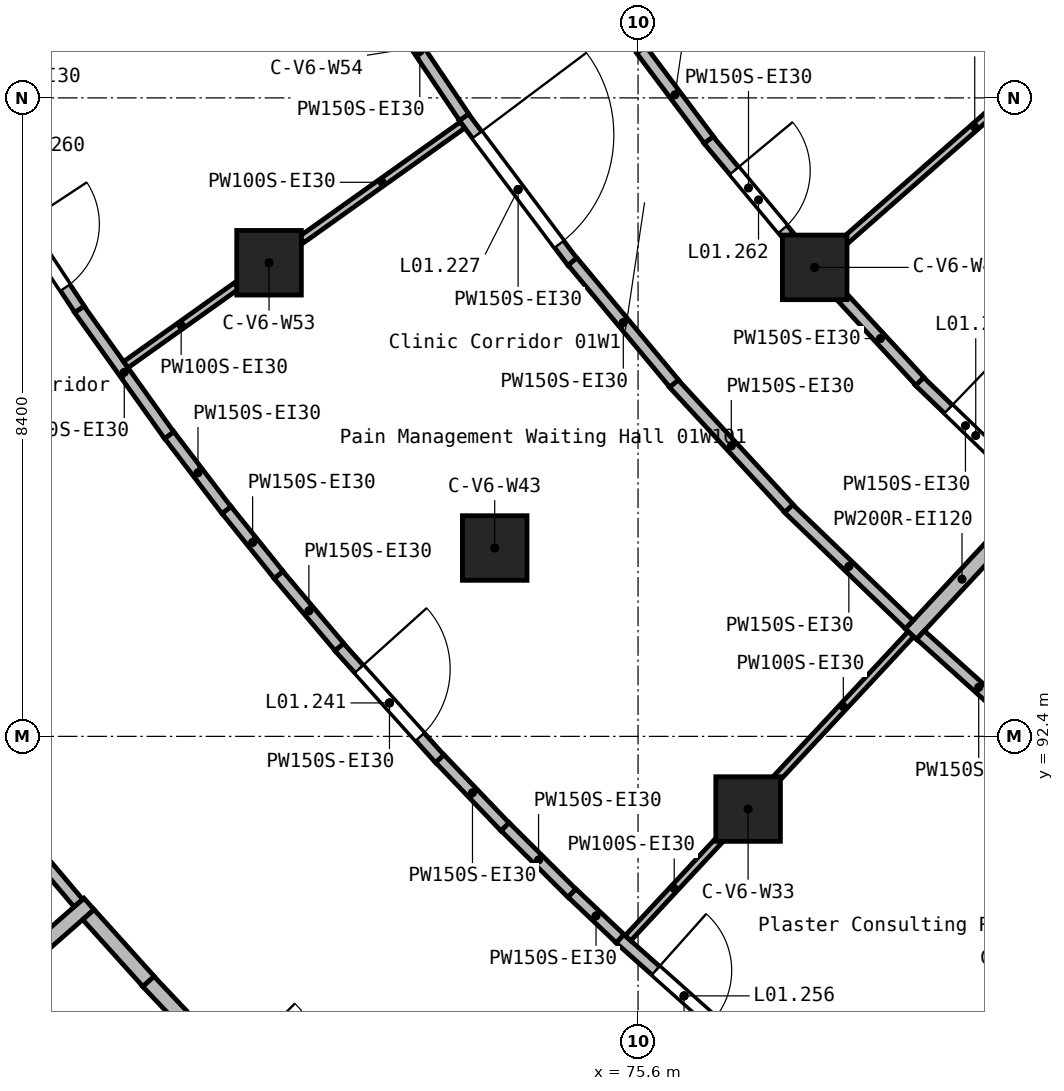
"""IFC4 building model, lengths in metres.
Left out: names, types, materials, properties, quantities, classifications, styles, units other than length and angle.
Written with IfcOpenShell. Run it as: python <this file> out.ifc"""

import sys

from ifc_helpers import new_model, si_unit, direction, frame, frame_2d, origin, origin_2d, place, context, subcontext, project, spatial, rectangle, extrude, element, fill, save


model = new_model("IFC4")
c1 = context("Model", 3, precision=1e-05, world=origin(), true_north=direction((0.0, 1.0)))
c2 = subcontext(c1, "Body", "Model", "MODEL_VIEW")
j1 = project(units=[si_unit("LENGTHUNIT", "METRE"), si_unit("PLANEANGLEUNIT", "RADIAN")], contexts=[c1])
p1 = place(None, origin())
s1 = spatial("IfcSite", under=j1, at=p1, CompositionType="ELEMENT")
p2 = place(p1, origin())
s2 = spatial("IfcBuilding", under=s1, at=p2, CompositionType="ELEMENT")
p3 = place(p2, frame((0.0, 0.0, 5.4)))
s3 = spatial("IfcBuildingStorey", under=s2, at=p3, CompositionType="ELEMENT", Elevation=5.4)
for number, where, z_axis, x_axis in (
    (1, (70.745, 98.631, 0.0), (0.0, 0.0, 1.0), (1.0, 0.0, 0.0)),
    (2, (73.714, 94.878, 0.0), (0.0, 0.0, 1.0), (1.0, 0.0, 0.0)),
    (3, (77.048, 91.444, 0.0), (0.0, 0.0, 1.0), (1.0, 0.0, 0.0)),
    (4, (77.924, 98.57, 0.0), (0.0, 0.0, 1.0), (1.0, 0.0, 0.0)),
):
    element("IfcColumn", number, at=place(p3, frame(where, z_axis=z_axis, x_axis=x_axis)), inside=s3, PredefinedType="COLUMN", context=c2, shape_type="SweptSolid", body=[
        extrude(rectangle(XDim=0.85, YDim=0.85, at=origin_2d()), origin(), (0.0, 0.0, 1.0), 4.5),
    ])
p4 = place(p3, frame((66.869, 88.874, 0.0), z_axis=(0.0, 0.0, 1.0), x_axis=(0.751874567132, 0.659306177205, 0.0)))
e5 = element("IfcWall", 5, at=p4, inside=s3, PredefinedType="SOLIDWALL", context=c2, shape_type="SweptSolid", body=[
    extrude(rectangle(XDim=2.004, YDim=0.2, at=frame_2d((1.002, 0.0))), origin(), (0.0, 0.0, 1.0), 4.15),
])
p5 = place(p3, frame((79.19, 93.746, 0.0), z_axis=(0.0, 0.0, 1.0), x_axis=(0.681171780306, 0.732123627344, 0.0)))
e6 = element("IfcWall", 6, at=p5, inside=s3, PredefinedType="SOLIDWALL", context=c2, shape_type="SweptSolid", body=[
    extrude(rectangle(XDim=1.974, YDim=0.2, at=frame_2d((0.987, 0.0))), origin(), (0.0, 0.0, 1.0), 4.15),
])
p6 = place(p3, frame((69.155, 89.177, 0.0), z_axis=(0.0, 0.0, 1.0), x_axis=(0.687313254989, -0.726361128858, 0.0)))
e7 = element("IfcWall", 7, at=p6, inside=s3, PredefinedType="SOLIDWALL", context=c2, shape_type="SweptSolid", body=[
    extrude(rectangle(XDim=1.382, YDim=0.2, at=frame_2d((0.691, 0.0))), origin(), (0.0, 0.0, 1.0), 4.15),
])
p7 = place(p3, frame((68.369, 90.055, 0.0), z_axis=(0.0, 0.0, 1.0), x_axis=(0.669113274241, -0.74316043102, 0.0)))
e8 = element("IfcWall", 8, at=p7, inside=s3, PredefinedType="SOLIDWALL", context=c2, shape_type="SweptSolid", body=[
    extrude(rectangle(XDim=1.18, YDim=0.2, at=frame_2d((0.59, 0.0))), origin(), (0.0, 0.0, 1.0), 4.15),
])
p8 = place(p3, frame((73.307, 100.547, 0.0), z_axis=(0.0, 0.0, 1.0), x_axis=(0.600377090661, -0.799717043091, 0.0)))
e9 = element("IfcWall", 9, at=p8, inside=s3, PredefinedType="PARTITIONING", context=c2, shape_type="SweptSolid", body=[
    extrude(rectangle(XDim=2.382, YDim=0.15, at=frame_2d((1.191, 0.0))), origin(), (0.0, 0.0, 1.0), 4.15),
])
p9 = place(p8, frame((0.291, 0.0, 0.0)))
e10 = element("IfcOpeningElement", 10, at=p9, cuts=e9, PredefinedType="OPENING", context=c2, shape_type="SweptSolid", body=[
    extrude(rectangle(XDim=1.8, YDim=2.1, at=frame_2d((0.9, 1.05))), frame((0.0, 0.085, 0.0), z_axis=(0.0, -1.0, 0.0), x_axis=(1.0, 0.0, 0.0)), (0.0, 0.0, 1.0), 0.17),
])
p10 = place(p3, frame((77.579, 95.4, 0.0), z_axis=(0.0, 0.0, 1.0), x_axis=(0.720594722174, -0.693356507415, 0.0)))
e11 = element("IfcWall", 11, at=p10, inside=s3, PredefinedType="PARTITIONING", context=c2, shape_type="SweptSolid", body=[
    extrude(rectangle(XDim=2.205, YDim=0.15, at=frame_2d((1.103, 0.0))), origin(), (0.0, 0.0, 1.0), 4.15),
])
p11 = place(p3, frame((76.069, 97.043, 0.0), z_axis=(0.0, 0.0, 1.0), x_axis=(0.678030610295, -0.735033666918, 0.0)))
e12 = element("IfcWall", 12, at=p11, inside=s3, PredefinedType="PARTITIONING", context=c2, shape_type="SweptSolid", body=[
    extrude(rectangle(XDim=2.236, YDim=0.15, at=frame_2d((1.118, 0.0))), origin(), (0.0, 0.0, 1.0), 4.15),
])
p12 = place(p3, frame((79.316, 93.733, 0.0), z_axis=(0.0, 0.0, 1.0), x_axis=(0.74346507851, -0.668774758073, 0.0)))
e13 = element("IfcWall", 13, at=p12, inside=s3, PredefinedType="PARTITIONING", context=c2, shape_type="SweptSolid", body=[
    extrude(rectangle(XDim=2.059, YDim=0.15, at=frame_2d((1.03, 0.0))), origin(), (0.0, 0.0, 1.0), 4.15),
])
p13 = place(p3, frame((72.145, 102.278, 0.0), z_axis=(0.0, 0.0, 1.0), x_axis=(0.558900636953, -0.829234633873, 0.0)))
e14 = element("IfcWall", 14, at=p13, inside=s3, PredefinedType="PARTITIONING", context=c2, shape_type="SweptSolid", body=[
    extrude(rectangle(XDim=2.089, YDim=0.15, at=frame_2d((1.044, 0.0))), origin(), (0.0, 0.0, 1.0), 4.15),
])
p14 = place(p3, frame((74.738, 98.647, 0.0), z_axis=(0.0, 0.0, 1.0), x_axis=(0.640000381719, -0.768374590548, 0.0)))
e15 = element("IfcWall", 15, at=p14, inside=s3, PredefinedType="PARTITIONING", context=c2, shape_type="SweptSolid", body=[
    extrude(rectangle(XDim=2.088, YDim=0.15, at=frame_2d((1.044, 0.0))), origin(), (0.0, 0.0, 1.0), 4.15),
])
p15 = place(p3, frame((75.36, 89.74, 0.0), z_axis=(0.0, 0.0, 1.0), x_axis=(0.746361982095, -0.665540225443, 0.0)))
e16 = element("IfcWall", 16, at=p15, inside=s3, PredefinedType="PARTITIONING", context=c2, shape_type="SweptSolid", body=[
    extrude(rectangle(XDim=2.266, YDim=0.15, at=frame_2d((1.133, 0.0))), origin(), (0.0, 0.0, 1.0), 4.15),
])
p16 = place(p15, frame((0.633, 0.0, 0.0)))
e17 = element("IfcOpeningElement", 17, at=p16, cuts=e16, PredefinedType="OPENING", context=c2, shape_type="SweptSolid", body=[
    extrude(rectangle(XDim=1.0, YDim=2.1, at=frame_2d((0.5, 1.05))), frame((0.0, 0.085, 0.0), z_axis=(0.0, -1.0, 0.0), x_axis=(1.0, 0.0, 0.0)), (0.0, 0.0, 1.0), 0.17),
])
p17 = place(p3, frame((79.301, 97.072, 0.0), z_axis=(0.0, 0.0, 1.0), x_axis=(0.720465115712, -0.69349118022, 0.0)))
e18 = element("IfcWall", 18, at=p17, inside=s3, PredefinedType="PARTITIONING", context=c2, shape_type="SweptSolid", body=[
    extrude(rectangle(XDim=1.684, YDim=0.15, at=frame_2d((0.842, 0.0))), origin(), (0.0, 0.0, 1.0), 4.15),
])
p18 = place(p17, frame((0.53, 0.0, 0.0)))
e19 = element("IfcOpeningElement", 19, at=p18, cuts=e18, PredefinedType="OPENING", context=c2, shape_type="SweptSolid", body=[
    extrude(rectangle(XDim=1.0, YDim=2.1, at=frame_2d((0.5, 1.05))), frame((0.0, 0.085, 0.0), z_axis=(0.0, -1.0, 0.0), x_axis=(1.0, 0.0, 0.0)), (0.0, 0.0, 1.0), 0.17),
])
p19 = place(p3, frame((78.27, 98.195, 0.0), z_axis=(0.0, 0.0, 1.0), x_axis=(0.678273469528, -0.73480956753, 0.0)))
e20 = element("IfcWall", 20, at=p19, inside=s3, PredefinedType="PARTITIONING", context=c2, shape_type="SweptSolid", body=[
    extrude(rectangle(XDim=1.529, YDim=0.15, at=frame_2d((0.764, 0.0))), origin(), (0.0, 0.0, 1.0), 4.15),
])
p20 = place(p3, frame((76.526, 100.249, 0.0), z_axis=(0.0, 0.0, 1.0), x_axis=(0.640038659854, -0.768342706019, 0.0)))
e21 = element("IfcWall", 21, at=p20, inside=s3, PredefinedType="PARTITIONING", context=c2, shape_type="SweptSolid", body=[
    extrude(rectangle(XDim=1.648, YDim=0.15, at=frame_2d((0.824, 0.0))), origin(), (0.0, 0.0, 1.0), 4.15),
])
p21 = place(p20, frame((0.53, 0.0, 0.0)))
e22 = element("IfcOpeningElement", 22, at=p21, cuts=e21, PredefinedType="OPENING", context=c2, shape_type="SweptSolid", body=[
    extrude(rectangle(XDim=1.0, YDim=2.1, at=frame_2d((0.5, 1.05))), frame((0.0, 0.085, 0.0), z_axis=(0.0, -1.0, 0.0), x_axis=(1.0, 0.0, 0.0)), (0.0, 0.0, 1.0), 0.17),
])
p22 = place(p3, frame((75.641, 101.434, 0.0), z_axis=(0.0, 0.0, 1.0), x_axis=(0.60023710435, -0.799822116825, 0.0)))
e23 = element("IfcWall", 23, at=p22, inside=s3, PredefinedType="PARTITIONING", context=c2, shape_type="SweptSolid", body=[
    extrude(rectangle(XDim=1.483, YDim=0.15, at=frame_2d((0.741, 0.0))), origin(), (0.0, 0.0, 1.0), 4.15),
])
p23 = place(p3, frame((67.052, 91.609, 0.0), z_axis=(0.0, 0.0, 1.0), x_axis=(0.645369063346, -0.763870913228, 0.0)))
e24 = element("IfcWall", 24, at=p23, inside=s3, PredefinedType="PARTITIONING", context=c2, shape_type="SweptSolid", body=[
    extrude(rectangle(XDim=1.833, YDim=0.15, at=frame_2d((0.917, 0.0))), origin(), (0.0, 0.0, 1.0), 4.15),
])
p24 = place(p3, frame((68.247, 98.02, 0.0), z_axis=(0.0, 0.0, 1.0), x_axis=(0.580842026392, -0.81401630228, 0.0)))
e25 = element("IfcWall", 25, at=p24, inside=s3, PredefinedType="PARTITIONING", context=c2, shape_type="SweptSolid", body=[
    extrude(rectangle(XDim=2.041, YDim=0.15, at=frame_2d((1.021, 0.0))), origin(), (0.0, 0.0, 1.0), 4.15),
])
p25 = place(p3, frame((71.667, 93.577, 0.0), z_axis=(0.0, 0.0, 1.0), x_axis=(0.668733315137, -0.743502355898, 0.0)))
e26 = element("IfcWall", 26, at=p25, inside=s3, PredefinedType="PARTITIONING", context=c2, shape_type="SweptSolid", body=[
    extrude(rectangle(XDim=1.982, YDim=0.15, at=frame_2d((0.991, 0.0))), origin(), (0.0, 0.0, 1.0), 4.15),
])
p26 = place(p25, frame((0.391, 0.0, 0.0)))
e27 = element("IfcOpeningElement", 27, at=p26, cuts=e26, PredefinedType="OPENING", context=c2, shape_type="SweptSolid", body=[
    extrude(rectangle(XDim=1.2, YDim=2.1, at=frame_2d((0.6, 1.05))), frame((0.0, 0.085, 0.0), z_axis=(0.0, -1.0, 0.0), x_axis=(1.0, 0.0, 0.0)), (0.0, 0.0, 1.0), 0.17),
])
p27 = place(p3, frame((67.244, 99.547, 0.0), z_axis=(0.0, 0.0, 1.0), x_axis=(0.550660027371, -0.834729617454, 0.0)))
e28 = element("IfcWall", 28, at=p27, inside=s3, PredefinedType="PARTITIONING", context=c2, shape_type="SweptSolid", body=[
    extrude(rectangle(XDim=1.83, YDim=0.15, at=frame_2d((0.915, 0.0))), origin(), (0.0, 0.0, 1.0), 4.15),
])
p28 = place(p27, frame((0.489, 0.0, 0.0)))
e29 = element("IfcOpeningElement", 29, at=p28, cuts=e28, PredefinedType="OPENING", context=c2, shape_type="SweptSolid", body=[
    extrude(rectangle(XDim=1.0, YDim=2.1, at=frame_2d((0.5, 1.05))), frame((0.0, 0.085, 0.0), z_axis=(0.0, -1.0, 0.0), x_axis=(1.0, 0.0, 0.0)), (0.0, 0.0, 1.0), 0.17),
])
p29 = place(p3, frame((69.433, 96.362, 0.0), z_axis=(0.0, 0.0, 1.0), x_axis=(0.606457599152, -0.795115828311, 0.0)))
e30 = element("IfcWall", 30, at=p29, inside=s3, PredefinedType="PARTITIONING", context=c2, shape_type="SweptSolid", body=[
    extrude(rectangle(XDim=1.242, YDim=0.15, at=frame_2d((0.621, 0.0))), origin(), (0.0, 0.0, 1.0), 4.15),
])
p30 = place(p3, frame((72.992, 92.106, 0.0), z_axis=(0.0, 0.0, 1.0), x_axis=(0.691209259047, -0.72265466179, 0.0)))
e31 = element("IfcWall", 31, at=p30, inside=s3, PredefinedType="PARTITIONING", context=c2, shape_type="SweptSolid", body=[
    extrude(rectangle(XDim=1.242, YDim=0.15, at=frame_2d((0.621, 0.0))), origin(), (0.0, 0.0, 1.0), 4.15),
])
p31 = place(p3, frame((70.869, 94.525, 0.0), z_axis=(0.0, 0.0, 1.0), x_axis=(0.645236922374, -0.763982535144, 0.0)))
e32 = element("IfcWall", 32, at=p31, inside=s3, PredefinedType="PARTITIONING", context=c2, shape_type="SweptSolid", body=[
    extrude(rectangle(XDim=1.242, YDim=0.15, at=frame_2d((0.621, 0.0))), origin(), (0.0, 0.0, 1.0), 4.15),
])
p32 = place(p3, frame((73.851, 91.211, 0.0), z_axis=(0.0, 0.0, 1.0), x_axis=(0.709168733207, -0.70503879882, 0.0)))
e33 = element("IfcWall", 33, at=p32, inside=s3, PredefinedType="PARTITIONING", context=c2, shape_type="SweptSolid", body=[
    extrude(rectangle(XDim=1.241, YDim=0.15, at=frame_2d((0.621, 0.0))), origin(), (0.0, 0.0, 1.0), 4.15),
])
p33 = place(p3, frame((70.187, 95.377, 0.0), z_axis=(0.0, 0.0, 1.0), x_axis=(0.626301399266, -0.779581013928, 0.0)))
e34 = element("IfcWall", 34, at=p33, inside=s3, PredefinedType="PARTITIONING", context=c2, shape_type="SweptSolid", body=[
    extrude(rectangle(XDim=1.093, YDim=0.15, at=frame_2d((0.546, 0.0))), origin(), (0.0, 0.0, 1.0), 4.15),
])
p34 = place(p3, frame((74.731, 90.339, 0.0), z_axis=(0.0, 0.0, 1.0), x_axis=(0.725923200466, -0.687775767984, 0.0)))
e35 = element("IfcWall", 35, at=p34, inside=s3, PredefinedType="PARTITIONING", context=c2, shape_type="SweptSolid", body=[
    extrude(rectangle(XDim=0.87, YDim=0.15, at=frame_2d((0.435, 0.0))), origin(), (0.0, 0.0, 1.0), 4.15),
])
p35 = place(p3, frame((78.338, 98.933, 0.0), z_axis=(0.0, 0.0, 1.0), x_axis=(0.751823288541, 0.659364650863, 0.0)))
e36 = element("IfcWall", 36, at=p35, inside=s3, PredefinedType="PARTITIONING", context=c2, shape_type="SweptSolid", body=[
    extrude(rectangle(XDim=4.5, YDim=0.1, at=frame_2d((2.25, 0.0))), origin(), (0.0, 0.0, 1.0), 4.15),
])
p36 = place(p3, frame((75.468, 89.746, 0.0), z_axis=(0.0, 0.0, 1.0), x_axis=(0.681143154038, 0.732150260334, 0.0)))
e37 = element("IfcWall", 37, at=p36, inside=s3, PredefinedType="PARTITIONING", context=c2, shape_type="SweptSolid", body=[
    extrude(rectangle(XDim=1.785, YDim=0.1, at=frame_2d((0.893, 0.0))), origin(), (0.0, 0.0, 1.0), 4.15),
])
p37 = place(p3, frame((77.412, 91.835, 0.0), z_axis=(0.0, 0.0, 1.0), x_axis=(0.681147107729, 0.732146582067, 0.0)))
e38 = element("IfcWall", 38, at=p37, inside=s3, PredefinedType="PARTITIONING", context=c2, shape_type="SweptSolid", body=[
    extrude(rectangle(XDim=2.609, YDim=0.1, at=frame_2d((1.304, 0.0))), origin(), (0.0, 0.0, 1.0), 4.15),
])
p38 = place(p3, frame((68.861, 97.29, 0.0), z_axis=(0.0, 0.0, 1.0), x_axis=(0.814701484378, 0.5798805837, 0.0)))
e39 = element("IfcWall", 39, at=p38, inside=s3, PredefinedType="PARTITIONING", context=c2, shape_type="SweptSolid", body=[
    extrude(rectangle(XDim=1.787, YDim=0.1, at=frame_2d((0.894, 0.0))), origin(), (0.0, 0.0, 1.0), 4.15),
])
p39 = place(p3, frame((71.173, 98.936, 0.0), z_axis=(0.0, 0.0, 1.0), x_axis=(0.814672160951, 0.579921779355, 0.0)))
e40 = element("IfcWall", 40, at=p39, inside=s3, PredefinedType="PARTITIONING", context=c2, shape_type="SweptSolid", body=[
    extrude(rectangle(XDim=2.598, YDim=0.1, at=frame_2d((1.299, 0.0))), origin(), (0.0, 0.0, 1.0), 4.15),
])
p40 = place(p9, origin())
e41 = element("IfcDoor", 41, at=p40, inside=s3, OperationType="DOUBLE_DOOR_SINGLE_SWING", PredefinedType="DOOR", context=c2, shape_type="SweptSolid", body=[
    extrude(rectangle(XDim=1.8, YDim=2.1, at=frame_2d((0.9, 1.05))), frame((0.0, 0.025, 0.0), z_axis=(0.0, -1.0, 0.0), x_axis=(1.0, 0.0, 0.0)), (0.0, 0.0, 1.0), 0.05),
])
fill(e10, e41)
p41 = place(p26, frame((1.2, 0.0, 0.0), z_axis=(0.0, 0.0, 1.0), x_axis=(-1.0, 0.0, 0.0)))
e42 = element("IfcDoor", 42, at=p41, inside=s3, OperationType="SINGLE_SWING_RIGHT", PredefinedType="DOOR", context=c2, shape_type="SweptSolid", body=[
    extrude(rectangle(XDim=1.2, YDim=2.1, at=frame_2d((0.6, 1.05))), frame((0.0, 0.025, 0.0), z_axis=(0.0, -1.0, 0.0), x_axis=(1.0, 0.0, 0.0)), (0.0, 0.0, 1.0), 0.05),
])
fill(e27, e42)
p42 = place(p16, origin())
e43 = element("IfcDoor", 43, at=p42, inside=s3, OperationType="SINGLE_SWING_LEFT", PredefinedType="DOOR", context=c2, shape_type="SweptSolid", body=[
    extrude(rectangle(XDim=1.0, YDim=2.1, at=frame_2d((0.5, 1.05))), frame((0.0, 0.025, 0.0), z_axis=(0.0, -1.0, 0.0), x_axis=(1.0, 0.0, 0.0)), (0.0, 0.0, 1.0), 0.05),
])
fill(e17, e43)
p43 = place(p28, origin())
e44 = element("IfcDoor", 44, at=p43, inside=s3, OperationType="SINGLE_SWING_RIGHT", PredefinedType="DOOR", context=c2, shape_type="SweptSolid", body=[
    extrude(rectangle(XDim=1.0, YDim=2.1, at=frame_2d((0.5, 1.05))), frame((0.0, 0.025, 0.0), z_axis=(0.0, -1.0, 0.0), x_axis=(1.0, 0.0, 0.0)), (0.0, 0.0, 1.0), 0.05),
])
fill(e29, e44)
p44 = place(p18, origin())
e45 = element("IfcDoor", 45, at=p44, inside=s3, OperationType="SINGLE_SWING_RIGHT", PredefinedType="DOOR", context=c2, shape_type="SweptSolid", body=[
    extrude(rectangle(XDim=1.0, YDim=2.1, at=frame_2d((0.5, 1.05))), frame((0.0, 0.025, 0.0), z_axis=(0.0, -1.0, 0.0), x_axis=(1.0, 0.0, 0.0)), (0.0, 0.0, 1.0), 0.05),
])
fill(e19, e45)
p45 = place(p21, origin())
e46 = element("IfcDoor", 46, at=p45, inside=s3, OperationType="SINGLE_SWING_RIGHT", PredefinedType="DOOR", context=c2, shape_type="SweptSolid", body=[
    extrude(rectangle(XDim=1.0, YDim=2.1, at=frame_2d((0.5, 1.05))), frame((0.0, 0.025, 0.0), z_axis=(0.0, -1.0, 0.0), x_axis=(1.0, 0.0, 0.0)), (0.0, 0.0, 1.0), 0.05),
])
fill(e22, e46)
save(model, sys.argv[1])
